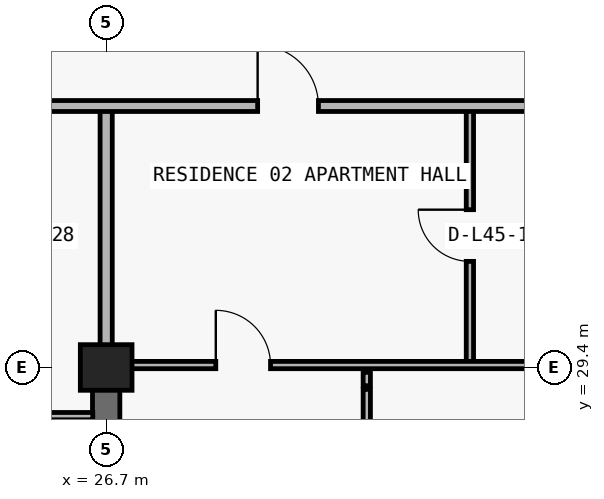
"""IFC4 building model, lengths in metres.
Left out: names, types, materials, properties, quantities, classifications, styles, units other than length and angle.
Written with IfcOpenShell. Run it as: python <this file> out.ifc"""

import sys

from ifc_helpers import new_model, si_unit, direction, frame, frame_2d, origin, origin_2d, place, context, subcontext, project, spatial, rectangle, extrude, element, fill, save


model = new_model("IFC4")
c1 = context("Model", 3, precision=1e-05, world=origin(), true_north=direction((0.0, 1.0)))
c2 = subcontext(c1, "Body", "Model", "MODEL_VIEW")
j1 = project(units=[si_unit("LENGTHUNIT", "METRE"), si_unit("PLANEANGLEUNIT", "RADIAN")], contexts=[c1])
p1 = place(None, origin())
s1 = spatial("IfcSite", under=j1, at=p1, CompositionType="ELEMENT")
p2 = place(p1, origin())
s2 = spatial("IfcBuilding", under=s1, at=p2, CompositionType="ELEMENT")
p3 = place(p2, frame((0.0, 0.0, 163.8)))
s3 = spatial("IfcBuildingStorey", under=s2, at=p3, CompositionType="ELEMENT", Elevation=163.8)
p4 = place(p3, frame((26.7, 29.4, 0.0), z_axis=(0.0, 0.0, 1.0), x_axis=(1.0, 0.0, 0.0)))
e1 = element("IfcColumn", 1, at=p4, inside=s3, PredefinedType="COLUMN", context=c2, shape_type="SweptSolid", body=[
    extrude(rectangle(XDim=0.85, YDim=0.75, at=origin_2d()), origin(), (0.0, 0.0, 1.0), 3.05),
])
p5 = place(p3, frame((26.7, 20.8, 0.0), z_axis=(0.0, 0.0, 1.0), x_axis=(0.0, 1.0, 0.0)))
e2 = element("IfcWall", 2, at=p5, inside=s3, PredefinedType="SHEAR", context=c2, shape_type="SweptSolid", body=[
    extrude(rectangle(XDim=8.6, YDim=0.45, at=frame_2d((4.3, 0.0))), origin(), (0.0, 0.0, 1.0), 3.05),
])
p6 = place(p3, frame((26.7, 29.44, 0.0), z_axis=(0.0, 0.0, 1.0), x_axis=(0.0, 1.0, 0.0)))
e3 = element("IfcWall", 3, at=p6, inside=s3, PredefinedType="PARTITIONING", context=c2, shape_type="SweptSolid", body=[
    extrude(rectangle(XDim=4.26, YDim=0.2, at=frame_2d((2.13, 0.0))), origin(), (0.0, 0.0, 1.0), 2.335),
])
p7 = place(p3, frame((30.986, 24.29, 0.0), z_axis=(0.0, 0.0, 1.0), x_axis=(0.0, 1.0, 0.0)))
e4 = element("IfcWall", 4, at=p7, inside=s3, PredefinedType="PARTITIONING", context=c2, shape_type="SweptSolid", body=[
    extrude(rectangle(XDim=4.75, YDim=0.12, at=frame_2d((2.375, 0.0))), origin(), (0.0, 0.0, 1.0), 2.499),
])
p8 = place(p7, frame((1.925, 0.0, 0.0)))
e5 = element("IfcOpeningElement", 5, at=p8, cuts=e4, PredefinedType="OPENING", context=c2, shape_type="SweptSolid", body=[
    extrude(rectangle(XDim=0.9, YDim=2.15, at=frame_2d((0.45, 1.075))), frame((0.0, 0.07, 0.0), z_axis=(0.0, -1.0, 0.0), x_axis=(1.0, 0.0, 0.0)), (0.0, 0.0, 1.0), 0.14),
])
p9 = place(p3, frame((30.986, 29.1, 0.0), z_axis=(0.0, 0.0, 1.0), x_axis=(0.0, 1.0, 0.0)))
e6 = element("IfcWall", 6, at=p9, inside=s3, PredefinedType="PARTITIONING", context=c2, shape_type="SweptSolid", body=[
    extrude(rectangle(XDim=0.22, YDim=0.12, at=frame_2d((0.11, 0.0))), origin(), (0.0, 0.0, 1.0), 2.499),
])
p10 = place(p3, frame((32.682, 29.44, 0.0), z_axis=(0.0, 0.0, 1.0), x_axis=(0.0, 1.0, 0.0)))
e7 = element("IfcWall", 7, at=p10, inside=s3, PredefinedType="PARTITIONING", context=c2, shape_type="SweptSolid", body=[
    extrude(rectangle(XDim=4.26, YDim=0.12, at=frame_2d((2.13, 0.0))), origin(), (0.0, 0.0, 1.0), 3.05),
])
p11 = place(p10, frame((1.705, 0.0, 0.0)))
e8 = element("IfcOpeningElement", 8, at=p11, cuts=e7, PredefinedType="OPENING", context=c2, shape_type="SweptSolid", body=[
    extrude(rectangle(XDim=0.85, YDim=2.1, at=frame_2d((0.425, 1.05))), frame((0.0, 0.07, 0.0), z_axis=(0.0, -1.0, 0.0), x_axis=(1.0, 0.0, 0.0)), (0.0, 0.0, 1.0), 0.14),
])
p12 = place(p3, frame((18.3, 28.6, 0.0), z_axis=(0.0, 0.0, 1.0), x_axis=(1.0, 0.0, 0.0)))
e9 = element("IfcWall", 9, at=p12, inside=s3, PredefinedType="PARTITIONING", context=c2, shape_type="SweptSolid", body=[
    extrude(rectangle(XDim=8.18, YDim=0.12, at=frame_2d((4.09, 0.0))), origin(), (0.0, 0.0, 1.0), 3.05),
])
p13 = place(p12, frame((2.809, 0.0, 0.0)))
e10 = element("IfcOpeningElement", 10, at=p13, cuts=e9, PredefinedType="OPENING", context=c2, shape_type="SweptSolid", body=[
    extrude(rectangle(XDim=0.9, YDim=2.15, at=frame_2d((0.45, 1.075))), frame((0.0, 0.07, 0.0), z_axis=(0.0, -1.0, 0.0), x_axis=(1.0, 0.0, 0.0)), (0.0, 0.0, 1.0), 0.14),
])
p14 = place(p3, frame((26.92, 29.44, 0.0), z_axis=(0.0, 0.0, 1.0), x_axis=(1.0, 0.0, 0.0)))
e11 = element("IfcWall", 11, at=p14, inside=s3, PredefinedType="PARTITIONING", context=c2, shape_type="SweptSolid", body=[
    extrude(rectangle(XDim=8.18, YDim=0.12, at=frame_2d((4.09, 0.0))), origin(), (0.0, 0.0, 1.0), 2.263),
])
p15 = place(p14, frame((1.583, 0.0, 0.0)))
e12 = element("IfcOpeningElement", 12, at=p15, cuts=e11, PredefinedType="OPENING", context=c2, shape_type="SweptSolid", body=[
    extrude(rectangle(XDim=0.9, YDim=2.15, at=frame_2d((0.45, 1.075))), frame((0.0, 0.07, 0.0), z_axis=(0.0, -1.0, 0.0), x_axis=(1.0, 0.0, 0.0)), (0.0, 0.0, 1.0), 0.14),
])
p16 = place(p3, frame((18.3, 33.7, 0.0), z_axis=(0.0, 0.0, 1.0), x_axis=(1.0, 0.0, 0.0)))
e13 = element("IfcWall", 13, at=p16, inside=s3, PredefinedType="PARTITIONING", context=c2, shape_type="SweptSolid", body=[
    extrude(rectangle(XDim=20.372, YDim=0.18, at=frame_2d((10.186, 0.0))), origin(), (0.0, 0.0, 1.0), 3.05),
])
p17 = place(p16, frame((10.891, 0.0, 0.0)))
e14 = element("IfcOpeningElement", 14, at=p17, cuts=e13, PredefinedType="OPENING", context=c2, shape_type="SweptSolid", body=[
    extrude(rectangle(XDim=1.0, YDim=2.2, at=frame_2d((0.5, 1.1))), frame((0.0, 0.1, 0.0), z_axis=(0.0, -1.0, 0.0), x_axis=(1.0, 0.0, 0.0)), (0.0, 0.0, 1.0), 0.2),
])
p18 = place(p16, frame((18.086, 0.0, 0.0)))
e15 = element("IfcOpeningElement", 15, at=p18, cuts=e13, PredefinedType="OPENING", context=c2, shape_type="SweptSolid", body=[
    extrude(rectangle(XDim=1.0, YDim=2.2, at=frame_2d((0.5, 1.1))), frame((0.0, 0.1, 0.0), z_axis=(0.0, -1.0, 0.0), x_axis=(1.0, 0.0, 0.0)), (0.0, 0.0, 1.0), 0.2),
])
p19 = place(p17, origin())
e16 = element("IfcDoor", 16, at=p19, inside=s3, OperationType="SINGLE_SWING_LEFT", PredefinedType="DOOR", context=c2, shape_type="SweptSolid", body=[
    extrude(rectangle(XDim=1.0, YDim=2.2, at=frame_2d((0.5, 1.1))), frame((0.0, 0.025, 0.0), z_axis=(0.0, -1.0, 0.0), x_axis=(1.0, 0.0, 0.0)), (0.0, 0.0, 1.0), 0.05),
])
fill(e14, e16)
p20 = place(p11, origin())
e17 = element("IfcDoor", 17, at=p20, inside=s3, OperationType="SINGLE_SWING_RIGHT", PredefinedType="DOOR", context=c2, shape_type="SweptSolid", body=[
    extrude(rectangle(XDim=0.85, YDim=2.1, at=frame_2d((0.425, 1.05))), frame((0.0, 0.025, 0.0), z_axis=(0.0, -1.0, 0.0), x_axis=(1.0, 0.0, 0.0)), (0.0, 0.0, 1.0), 0.05),
])
fill(e8, e17)
p21 = place(p15, origin())
e18 = element("IfcDoor", 18, at=p21, inside=s3, OperationType="SINGLE_SWING_LEFT", PredefinedType="DOOR", context=c2, shape_type="SweptSolid", body=[
    extrude(rectangle(XDim=0.9, YDim=2.15, at=frame_2d((0.45, 1.075))), frame((0.0, 0.025, 0.0), z_axis=(0.0, -1.0, 0.0), x_axis=(1.0, 0.0, 0.0)), (0.0, 0.0, 1.0), 0.05),
])
fill(e12, e18)
save(model, sys.argv[1])
